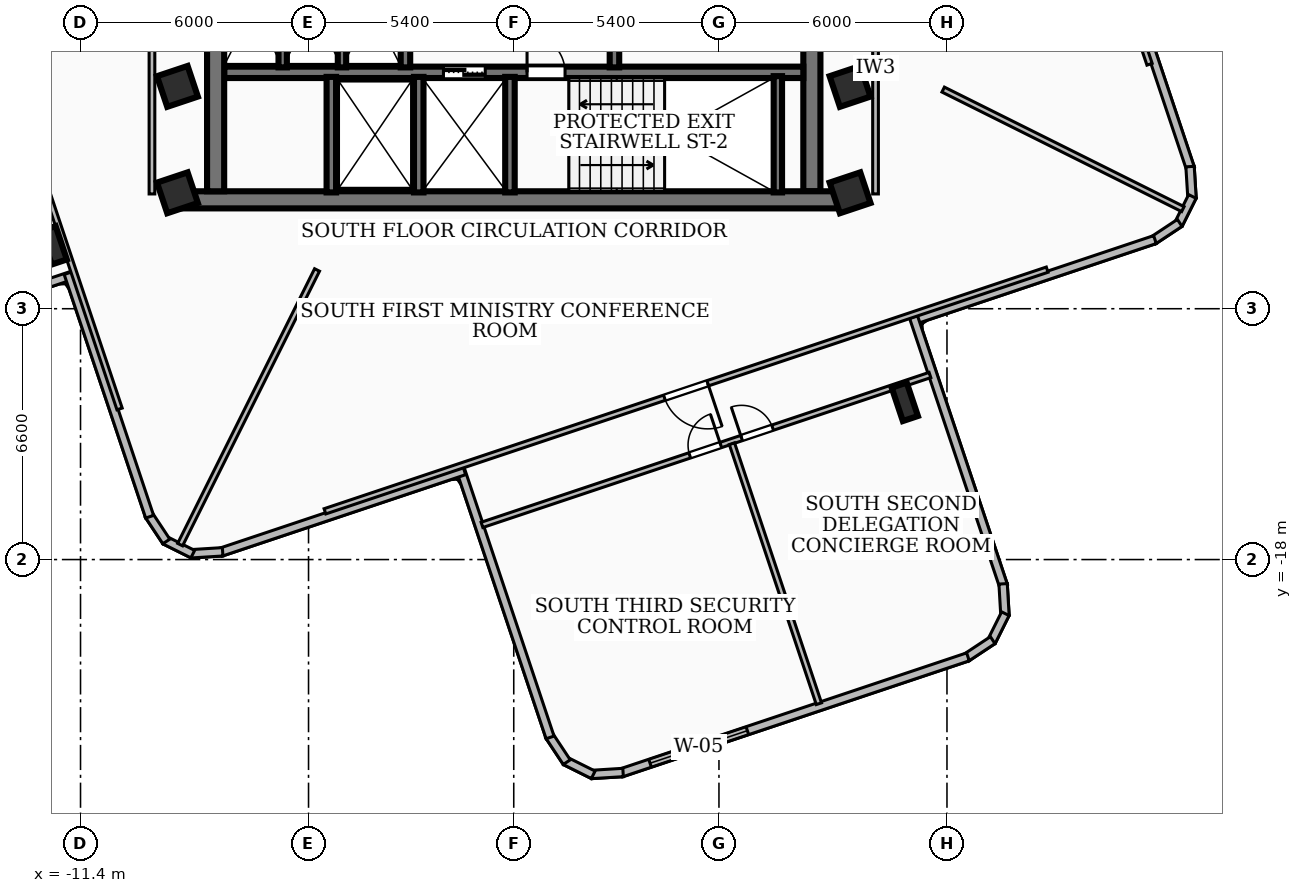
"""IFC4 building model, lengths in metres.
Left out: names, types, materials, properties, quantities, classifications, styles, units other than length and angle.
Written with IfcOpenShell. Run it as: python <this file> out.ifc"""

import sys

from ifc_helpers import new_model, si_unit, direction, frame, frame_2d, origin, origin_2d, place, context, subcontext, project, spatial, rectangle, i_section, extrude, element, fill, save


model = new_model("IFC4")
c1 = context("Model", 3, precision=1e-05, world=origin(), true_north=direction((0.0, 1.0)))
c2 = subcontext(c1, "Body", "Model", "MODEL_VIEW")
j1 = project(units=[si_unit("LENGTHUNIT", "METRE"), si_unit("PLANEANGLEUNIT", "RADIAN")], contexts=[c1])
p1 = place(None, origin())
s1 = spatial("IfcSite", under=j1, at=p1, CompositionType="ELEMENT")
p2 = place(p1, origin())
s2 = spatial("IfcBuilding", under=s1, at=p2, CompositionType="ELEMENT")
p3 = place(p2, frame((0.0, 0.0, 163.08)))
s3 = spatial("IfcBuildingStorey", under=s2, at=p3, CompositionType="ELEMENT", Elevation=163.08)
p4 = place(p3, frame((8.78, -8.535, 0.0), z_axis=(0.0, 0.0, 1.0), x_axis=(-1.0, 0.0, 0.0)))
e1 = element("IfcWall", 1, at=p4, inside=s3, PredefinedType="SHEAR", context=c2, shape_type="SweptSolid", body=[
    extrude(rectangle(XDim=17.56, YDim=0.45, at=frame_2d((8.78, 0.0))), origin(), (0.0, 0.0, 1.0), 3.34),
])
for number, where, z_axis, x_axis in (
    (2, (-7.845, -8.31, 0.0), (0.0, 0.0, 1.0), (0.0, 1.0, 0.0)),
    (3, (7.845, -1.975, 0.0), (0.0, 0.0, 1.0), (0.0, -1.0, 0.0)),
):
    element("IfcWall", number, at=place(p3, frame(where, z_axis=z_axis, x_axis=x_axis)), inside=s3, PredefinedType="SHEAR", context=c2, shape_type="SweptSolid", body=[
        extrude(rectangle(XDim=6.335, YDim=0.45, at=frame_2d((3.167, 0.0))), origin(), (0.0, 0.0, 1.0), 3.34),
    ])
p5 = place(p3, frame((-7.62, -5.18, 0.0), z_axis=(0.0, 0.0, 1.0), x_axis=(1.0, 0.0, 0.0)))
e4 = element("IfcWall", 4, at=p5, inside=s3, PredefinedType="SOLIDWALL", context=c2, shape_type="SweptSolid", body=[
    extrude(rectangle(XDim=15.24, YDim=0.3, at=frame_2d((7.62, 0.0))), origin(), (0.0, 0.0, 1.0), 3.34),
])
p6 = place(p5, frame((5.77, 0.0, 0.0)))
e5 = element("IfcOpeningElement", 5, at=p6, cuts=e4, PredefinedType="OPENING", context=c2, shape_type="SweptSolid", body=[
    extrude(rectangle(XDim=1.1, YDim=2.15, at=frame_2d((0.55, 1.075))), frame((0.0, 0.16, 0.0), z_axis=(0.0, -1.0, 0.0), x_axis=(1.0, 0.0, 0.0)), (0.0, 0.0, 1.0), 0.32),
])
p7 = place(p5, frame((7.97, 0.0, 0.0)))
e6 = element("IfcOpeningElement", 6, at=p7, cuts=e4, PredefinedType="OPENING", context=c2, shape_type="SweptSolid", body=[
    extrude(rectangle(XDim=1.0, YDim=2.1, at=frame_2d((0.5, 1.05))), frame((0.0, 0.16, 0.0), z_axis=(0.0, -1.0, 0.0), x_axis=(1.0, 0.0, 0.0)), (0.0, 0.0, 1.0), 0.32),
])
p8 = place(p3, frame((6.95, -8.34, 0.0), z_axis=(0.0, 0.0, 1.0), x_axis=(0.0, 1.0, 0.0)))
e7 = element("IfcWall", 7, at=p8, inside=s3, PredefinedType="SOLIDWALL", context=c2, shape_type="SweptSolid", body=[
    extrude(rectangle(XDim=3.06, YDim=0.22, at=frame_2d((1.53, 0.0))), origin(), (0.0, 0.0, 1.0), 3.34),
])
for number, where, z_axis, x_axis in (
    (8, (-0.1, -8.34, 0.0), (0.0, 0.0, 1.0), (0.0, 1.0, 0.0)),
    (9, (-2.5, -8.34, 0.0), (0.0, 0.0, 1.0), (0.0, 1.0, 0.0)),
    (10, (-4.8, -8.34, 0.0), (0.0, 0.0, 1.0), (0.0, 1.0, 0.0)),
):
    element("IfcWall", number, at=place(p3, frame(where, z_axis=z_axis, x_axis=x_axis)), inside=s3, PredefinedType="SOLIDWALL", context=c2, shape_type="SweptSolid", body=[
        extrude(rectangle(XDim=3.04, YDim=0.25, at=frame_2d((1.52, 0.0))), origin(), (0.0, 0.0, 1.0), 3.34),
    ])
for number, where, z_axis, x_axis in (
    (11, (-2.85, -5.05, 0.0), (0.0, 0.0, 1.0), (0.0, 1.0, 0.0)),
    (12, (2.65, -5.05, 0.0), (0.0, 0.0, 1.0), (0.0, 1.0, 0.0)),
):
    element("IfcWall", number, at=place(p3, frame(where, z_axis=z_axis, x_axis=x_axis)), inside=s3, PredefinedType="SOLIDWALL", context=c2, shape_type="SweptSolid", body=[
        extrude(rectangle(XDim=3.07, YDim=0.25, at=frame_2d((1.535, 0.0))), origin(), (0.0, 0.0, 1.0), 3.34),
    ])
for number, where, z_axis, x_axis in (
    (13, (-6.08, -5.05, 0.0), (0.0, 0.0, 1.0), (0.0, 1.0, 0.0)),
    (14, (-4.52, -5.05, 0.0), (0.0, 0.0, 1.0), (0.0, 1.0, 0.0)),
):
    element("IfcWall", number, at=place(p3, frame(where, z_axis=z_axis, x_axis=x_axis)), inside=s3, PredefinedType="SOLIDWALL", context=c2, shape_type="SweptSolid", body=[
        extrude(rectangle(XDim=3.07, YDim=0.22, at=frame_2d((1.535, 0.0))), origin(), (0.0, 0.0, 1.0), 3.34),
    ])
for number, where, z_axis, x_axis in (
    (15, (-8.85, -5.55, 0.0), (0.0, 0.0, 1.0), (0.948, 0.317, 0.0)),
    (16, (8.85, -5.55, 0.0), (0.0, 0.0, 1.0), (0.948, 0.317, 0.0)),
    (17, (8.85, -8.35, 0.0), (0.0, 0.0, 1.0), (0.948, 0.317, 0.0)),
    (18, (-8.85, -8.35, 0.0), (0.0, 0.0, 1.0), (0.948, 0.317, 0.0)),
):
    element("IfcColumn", number, at=place(p3, frame(where, z_axis=z_axis, x_axis=x_axis)), inside=s3, PredefinedType="COLUMN", context=c2, shape_type="SweptSolid", body=[
        extrude(rectangle(XDim=0.85, YDim=0.85, at=origin_2d()), origin(), (0.0, 0.0, 1.0), 3.6),
    ])
for number, where, z_axis, x_axis in (
    (19, (-12.106, -9.731, 0.0), (0.0, 0.0, 1.0), (0.948, 0.317, 0.0)),
    (20, (3.29, -19.536, 0.0), (0.0, 0.0, 1.0), (0.948, 0.317, 0.0)),
    (21, (10.29, -13.85, 0.0), (0.0, 0.0, 1.0), (0.948, 0.317, 0.0)),
):
    element("IfcColumn", number, at=place(p3, frame(where, z_axis=z_axis, x_axis=x_axis)), inside=s3, PredefinedType="COLUMN", context=c2, shape_type="SweptSolid", body=[
        extrude(i_section(OverallWidth=0.418, OverallDepth=0.927, WebThickness=0.019, FlangeThickness=0.032, at=origin_2d()), origin(), (0.0, 0.0, 1.0), 3.6),
    ])
p9 = place(p3, frame((-11.615, -10.519, 0.0), z_axis=(0.0, 0.0, 1.0), x_axis=(-0.948329626758, -0.317286808759, 0.0)))
e22 = element("IfcWall", 22, at=p9, inside=s3, PredefinedType="SOLIDWALL", context=c2, shape_type="SweptSolid", body=[
    extrude(rectangle(XDim=9.058, YDim=0.22, at=frame_2d((4.529, 0.0))), origin(), (0.0, 0.0, 1.0), 2.72),
])
p10 = place(p3, frame((15.662, -1.3, 0.0), z_axis=(0.0, 0.0, 1.0), x_axis=(0.317224676093, -0.948350412494, 0.0)))
e23 = element("IfcWall", 23, at=p10, inside=s3, PredefinedType="SOLIDWALL", context=c2, shape_type="SweptSolid", body=[
    extrude(rectangle(XDim=6.758, YDim=0.22, at=frame_2d((3.379, 0.0))), origin(), (0.0, 0.0, 1.0), 3.34),
])
p11 = place(p3, frame((17.796, -7.66, 0.0), z_axis=(0.0, 0.0, 1.0), x_axis=(0.062305442082, -0.998057128569, 0.0)))
e24 = element("IfcWall", 24, at=p11, inside=s3, PredefinedType="SOLIDWALL", context=c2, shape_type="SweptSolid", body=[
    extrude(rectangle(XDim=0.835, YDim=0.22, at=frame_2d((0.417, 0.0))), origin(), (0.0, 0.0, 1.0), 3.34),
])
p12 = place(p3, frame((17.857, -8.446, 0.0), z_axis=(0.0, 0.0, 1.0), x_axis=(-0.446258139106, -0.894904281631, 0.0)))
e25 = element("IfcWall", 25, at=p12, inside=s3, PredefinedType="SOLIDWALL", context=c2, shape_type="SweptSolid", body=[
    extrude(rectangle(XDim=0.818, YDim=0.22, at=frame_2d((0.409, 0.0))), origin(), (0.0, 0.0, 1.0), 3.34),
])
p13 = place(p3, frame((17.524, -9.142, 0.0), z_axis=(0.0, 0.0, 1.0), x_axis=(-0.833756011094, -0.552133058206, 0.0)))
e26 = element("IfcWall", 26, at=p13, inside=s3, PredefinedType="SOLIDWALL", context=c2, shape_type="SweptSolid", body=[
    extrude(rectangle(XDim=0.835, YDim=0.22, at=frame_2d((0.417, 0.0))), origin(), (0.0, 0.0, 1.0), 3.34),
])
p14 = place(p3, frame((16.873, -9.581, 0.0), z_axis=(0.0, 0.0, 1.0), x_axis=(-0.94829606055, -0.317387116224, 0.0)))
e27 = element("IfcWall", 27, at=p14, inside=s3, PredefinedType="SOLIDWALL", context=c2, shape_type="SweptSolid", body=[
    extrude(rectangle(XDim=6.758, YDim=0.22, at=frame_2d((3.379, 0.0))), origin(), (0.0, 0.0, 1.0), 3.34),
])
p15 = place(p3, frame((10.519, -11.615, 0.0), z_axis=(0.0, 0.0, 1.0), x_axis=(0.317347016501, -0.948309480664, 0.0)))
e28 = element("IfcWall", 28, at=p15, inside=s3, PredefinedType="SOLIDWALL", context=c2, shape_type="SweptSolid", body=[
    extrude(rectangle(XDim=7.458, YDim=0.22, at=frame_2d((3.729, 0.0))), origin(), (0.0, 0.0, 1.0), 3.34),
])
p16 = place(p3, frame((12.877, -18.639, 0.0), z_axis=(0.0, 0.0, 1.0), x_axis=(0.05880777677, -0.998269325078, 0.0)))
e29 = element("IfcWall", 29, at=p16, inside=s3, PredefinedType="SOLIDWALL", context=c2, shape_type="SweptSolid", body=[
    extrude(rectangle(XDim=0.834, YDim=0.22, at=frame_2d((0.417, 0.0))), origin(), (0.0, 0.0, 1.0), 3.34),
])
p17 = place(p3, frame((12.936, -19.425, 0.0), z_axis=(0.0, 0.0, 1.0), x_axis=(-0.446258139106, -0.894904281631, 0.0)))
e30 = element("IfcWall", 30, at=p17, inside=s3, PredefinedType="SOLIDWALL", context=c2, shape_type="SweptSolid", body=[
    extrude(rectangle(XDim=0.818, YDim=0.22, at=frame_2d((0.409, 0.0))), origin(), (0.0, 0.0, 1.0), 3.34),
])
p18 = place(p3, frame((12.603, -20.121, 0.0), z_axis=(0.0, 0.0, 1.0), x_axis=(-0.833756011094, -0.552133058206, 0.0)))
e31 = element("IfcWall", 31, at=p18, inside=s3, PredefinedType="SOLIDWALL", context=c2, shape_type="SweptSolid", body=[
    extrude(rectangle(XDim=0.835, YDim=0.22, at=frame_2d((0.417, 0.0))), origin(), (0.0, 0.0, 1.0), 3.34),
])
p19 = place(p3, frame((11.952, -20.56, 0.0), z_axis=(0.0, 0.0, 1.0), x_axis=(-0.94831980895, -0.317316151421, 0.0)))
e32 = element("IfcWall", 32, at=p19, inside=s3, PredefinedType="SOLIDWALL", context=c2, shape_type="SweptSolid", body=[
    extrude(rectangle(XDim=9.621, YDim=0.22, at=frame_2d((4.811, 0.0))), origin(), (0.0, 0.0, 1.0), 3.34),
])
p20 = place(p19, frame((6.121, 0.0, 0.85)))
e33 = element("IfcOpeningElement", 33, at=p20, cuts=e32, PredefinedType="OPENING", context=c2, shape_type="SweptSolid", body=[
    extrude(rectangle(XDim=2.7, YDim=1.85, at=frame_2d((1.35, 0.925))), frame((0.0, 0.12, 0.0), z_axis=(0.0, -1.0, 0.0), x_axis=(1.0, 0.0, 0.0)), (0.0, 0.0, 1.0), 0.24),
])
p21 = place(p3, frame((2.877, -23.603, 0.0), z_axis=(0.0, 0.0, 1.0), x_axis=(-0.998057128569, -0.062305442082, 0.0)))
e34 = element("IfcWall", 34, at=p21, inside=s3, PredefinedType="SOLIDWALL", context=c2, shape_type="SweptSolid", body=[
    extrude(rectangle(XDim=0.835, YDim=0.22, at=frame_2d((0.417, 0.0))), origin(), (0.0, 0.0, 1.0), 3.34),
])
p22 = place(p3, frame((2.091, -23.664, 0.0), z_axis=(0.0, 0.0, 1.0), x_axis=(-0.894963703084, 0.446138958356, 0.0)))
e35 = element("IfcWall", 35, at=p22, inside=s3, PredefinedType="SOLIDWALL", context=c2, shape_type="SweptSolid", body=[
    extrude(rectangle(XDim=0.818, YDim=0.22, at=frame_2d((0.409, 0.0))), origin(), (0.0, 0.0, 1.0), 3.34),
])
p23 = place(p3, frame((1.395, -23.331, 0.0), z_axis=(0.0, 0.0, 1.0), x_axis=(-0.552133058206, 0.833756011094, 0.0)))
e36 = element("IfcWall", 36, at=p23, inside=s3, PredefinedType="SOLIDWALL", context=c2, shape_type="SweptSolid", body=[
    extrude(rectangle(XDim=0.835, YDim=0.22, at=frame_2d((0.417, 0.0))), origin(), (0.0, 0.0, 1.0), 3.34),
])
p24 = place(p3, frame((0.956, -22.68, 0.0), z_axis=(0.0, 0.0, 1.0), x_axis=(-0.317347016501, 0.948309480664, 0.0)))
e37 = element("IfcWall", 37, at=p24, inside=s3, PredefinedType="SOLIDWALL", context=c2, shape_type="SweptSolid", body=[
    extrude(rectangle(XDim=7.458, YDim=0.22, at=frame_2d((3.729, 0.0))), origin(), (0.0, 0.0, 1.0), 2.644),
])
p25 = place(p3, frame((-1.3, -15.662, 0.0), z_axis=(0.0, 0.0, 1.0), x_axis=(-0.948350412494, -0.317224676093, 0.0)))
e38 = element("IfcWall", 38, at=p25, inside=s3, PredefinedType="SOLIDWALL", context=c2, shape_type="SweptSolid", body=[
    extrude(rectangle(XDim=6.758, YDim=0.22, at=frame_2d((3.379, 0.0))), origin(), (0.0, 0.0, 1.0), 2.644),
])
p26 = place(p3, frame((-7.66, -17.796, 0.0), z_axis=(0.0, 0.0, 1.0), x_axis=(-0.998057128569, -0.062305442082, 0.0)))
e39 = element("IfcWall", 39, at=p26, inside=s3, PredefinedType="SOLIDWALL", context=c2, shape_type="SweptSolid", body=[
    extrude(rectangle(XDim=0.835, YDim=0.22, at=frame_2d((0.417, 0.0))), origin(), (0.0, 0.0, 1.0), 3.34),
])
p27 = place(p3, frame((-8.446, -17.857, 0.0), z_axis=(0.0, 0.0, 1.0), x_axis=(-0.894904281631, 0.446258139106, 0.0)))
e40 = element("IfcWall", 40, at=p27, inside=s3, PredefinedType="SOLIDWALL", context=c2, shape_type="SweptSolid", body=[
    extrude(rectangle(XDim=0.818, YDim=0.22, at=frame_2d((0.409, 0.0))), origin(), (0.0, 0.0, 1.0), 3.34),
])
p28 = place(p3, frame((-9.142, -17.524, 0.0), z_axis=(0.0, 0.0, 1.0), x_axis=(-0.552133058206, 0.833756011094, 0.0)))
e41 = element("IfcWall", 41, at=p28, inside=s3, PredefinedType="SOLIDWALL", context=c2, shape_type="SweptSolid", body=[
    extrude(rectangle(XDim=0.835, YDim=0.22, at=frame_2d((0.417, 0.0))), origin(), (0.0, 0.0, 1.0), 3.34),
])
p29 = place(p3, frame((-9.581, -16.873, 0.0), z_axis=(0.0, 0.0, 1.0), x_axis=(-0.317387116224, 0.94829606055, 0.0)))
e42 = element("IfcWall", 42, at=p29, inside=s3, PredefinedType="SOLIDWALL", context=c2, shape_type="SweptSolid", body=[
    extrude(rectangle(XDim=6.758, YDim=0.22, at=frame_2d((3.379, 0.0))), origin(), (0.0, 0.0, 1.0), 2.72),
])
p30 = place(p3, frame((-9.52, -8.38, 0.0), z_axis=(0.0, 0.0, 1.0), x_axis=(0.0, 1.0, 0.0)))
e43 = element("IfcWall", 43, at=p30, inside=s3, PredefinedType="PARTITIONING", context=c2, shape_type="SweptSolid", body=[
    extrude(rectangle(XDim=6.63, YDim=0.15, at=frame_2d((3.315, 0.0))), origin(), (0.0, 0.0, 1.0), 2.644),
])
p31 = place(p3, frame((9.52, -8.38, 0.0), z_axis=(0.0, 0.0, 1.0), x_axis=(0.0, 1.0, 0.0)))
e44 = element("IfcWall", 44, at=p31, inside=s3, PredefinedType="PARTITIONING", context=c2, shape_type="SweptSolid", body=[
    extrude(rectangle(XDim=6.63, YDim=0.15, at=frame_2d((3.315, 0.0))), origin(), (0.0, 0.0, 1.0), 3.34),
])
p32 = place(p3, frame((-5.176, -10.38, 0.0), z_axis=(0.0, 0.0, 1.0), x_axis=(-0.446173290391, -0.894946587759, 0.0)))
e45 = element("IfcWall", 45, at=p32, inside=s3, PredefinedType="PARTITIONING", context=c2, shape_type="SweptSolid", body=[
    extrude(rectangle(XDim=8.075, YDim=0.145, at=frame_2d((4.038, 0.0))), origin(), (0.0, 0.0, 1.0), 2.644),
])
p33 = place(p3, frame((11.3, -5.634, 0.0), z_axis=(0.0, 0.0, 1.0), x_axis=(0.894904738475, -0.446257222972, 0.0)))
e46 = element("IfcWall", 46, at=p33, inside=s3, PredefinedType="PARTITIONING", context=c2, shape_type="SweptSolid", body=[
    extrude(rectangle(XDim=7.048, YDim=0.145, at=frame_2d((3.524, 0.0))), origin(), (0.0, 0.0, 1.0), 3.34),
])
p34 = place(p3, frame((10.372, 14.037, 0.0), z_axis=(0.0, 0.0, 1.0), x_axis=(0.317298382655, -0.94832575435, 0.0)))
e47 = element("IfcWall", 47, at=p34, inside=s3, PredefinedType="PARTITIONING", context=c2, shape_type="SweptSolid", body=[
    extrude(rectangle(XDim=20.041, YDim=0.145, at=frame_2d((10.021, 0.0))), origin(), (0.0, 0.0, 1.0), 2.644),
])
p35 = place(p34, frame((9.42, 0.0, 0.0)))
e48 = element("IfcOpeningElement", 48, at=p35, cuts=e47, PredefinedType="OPENING", context=c2, shape_type="SweptSolid", body=[
    extrude(rectangle(XDim=1.2, YDim=2.1, at=frame_2d((0.6, 1.05))), frame((0.0, 0.083, 0.0), z_axis=(0.0, -1.0, 0.0), x_axis=(1.0, 0.0, 0.0)), (0.0, 0.0, 1.0), 0.165),
])
p36 = place(p3, frame((-10.372, -14.037, 0.0), z_axis=(0.0, 0.0, 1.0), x_axis=(-0.317298382655, 0.94832575435, 0.0)))
e49 = element("IfcWall", 49, at=p36, inside=s3, PredefinedType="PARTITIONING", context=c2, shape_type="SweptSolid", body=[
    extrude(rectangle(XDim=20.041, YDim=0.145, at=frame_2d((10.021, 0.0))), origin(), (0.0, 0.0, 1.0), 2.644),
])
p37 = place(p36, frame((9.42, 0.0, 0.0)))
e50 = element("IfcOpeningElement", 50, at=p37, cuts=e49, PredefinedType="OPENING", context=c2, shape_type="SweptSolid", body=[
    extrude(rectangle(XDim=1.2, YDim=2.1, at=frame_2d((0.6, 1.05))), frame((0.0, 0.083, 0.0), z_axis=(0.0, -1.0, 0.0), x_axis=(1.0, 0.0, 0.0)), (0.0, 0.0, 1.0), 0.165),
])
p38 = place(p3, frame((14.037, -10.372, 0.0), z_axis=(0.0, 0.0, 1.0), x_axis=(-0.94832575435, -0.317298382655, 0.0)))
e51 = element("IfcWall", 51, at=p38, inside=s3, PredefinedType="PARTITIONING", context=c2, shape_type="SweptSolid", body=[
    extrude(rectangle(XDim=20.041, YDim=0.145, at=frame_2d((10.021, 0.0))), origin(), (0.0, 0.0, 1.0), 2.644),
])
p39 = place(p38, frame((9.42, 0.0, 0.0)))
e52 = element("IfcOpeningElement", 52, at=p39, cuts=e51, PredefinedType="OPENING", context=c2, shape_type="SweptSolid", body=[
    extrude(rectangle(XDim=1.2, YDim=2.1, at=frame_2d((0.6, 1.05))), frame((0.0, 0.083, 0.0), z_axis=(0.0, -1.0, 0.0), x_axis=(1.0, 0.0, 0.0)), (0.0, 0.0, 1.0), 0.165),
])
p40 = place(p3, frame((5.741, -14.951, 0.0), z_axis=(0.0, 0.0, 1.0), x_axis=(0.317273194857, -0.948334181513, 0.0)))
e53 = element("IfcWall", 53, at=p40, inside=s3, PredefinedType="PARTITIONING", context=c2, shape_type="SweptSolid", body=[
    extrude(rectangle(XDim=7.215, YDim=0.145, at=frame_2d((3.607, 0.0))), origin(), (0.0, 0.0, 1.0), 3.34),
])
p41 = place(p3, frame((-0.836, -17.088, 0.0), z_axis=(0.0, 0.0, 1.0), x_axis=(0.948331136084, 0.317282297544, 0.0)))
e54 = element("IfcWall", 54, at=p41, inside=s3, PredefinedType="PARTITIONING", context=c2, shape_type="SweptSolid", body=[
    extrude(rectangle(XDim=12.43, YDim=0.145, at=frame_2d((6.215, 0.0))), origin(), (0.0, 0.0, 1.0), 2.644),
])
p42 = place(p41, frame((5.765, 0.0, 0.0)))
e55 = element("IfcOpeningElement", 55, at=p42, cuts=e54, PredefinedType="OPENING", context=c2, shape_type="SweptSolid", body=[
    extrude(rectangle(XDim=0.86, YDim=2.04, at=frame_2d((0.43, 1.02))), frame((0.0, 0.083, 0.0), z_axis=(0.0, -1.0, 0.0), x_axis=(1.0, 0.0, 0.0)), (0.0, 0.0, 1.0), 0.165),
])
p43 = place(p41, frame((7.204, 0.0, 0.0)))
e56 = element("IfcOpeningElement", 56, at=p43, cuts=e54, PredefinedType="OPENING", context=c2, shape_type="SweptSolid", body=[
    extrude(rectangle(XDim=0.86, YDim=2.04, at=frame_2d((0.43, 1.02))), frame((0.0, 0.083, 0.0), z_axis=(0.0, -1.0, 0.0), x_axis=(1.0, 0.0, 0.0)), (0.0, 0.0, 1.0), 0.165),
])
p44 = place(p20, origin())
e57 = element("IfcWindow", 57, at=p44, inside=s3, PartitioningType="SINGLE_PANEL", PredefinedType="WINDOW", context=c2, shape_type="SweptSolid", body=[
    extrude(rectangle(XDim=2.7, YDim=1.85, at=frame_2d((1.35, 0.925))), frame((0.0, 0.03, 0.0), z_axis=(0.0, -1.0, 0.0), x_axis=(1.0, 0.0, 0.0)), (0.0, 0.0, 1.0), 0.06),
])
fill(e33, e57)
p45 = place(p6, origin())
e58 = element("IfcDoor", 58, at=p45, inside=s3, OperationType="DOUBLE_DOOR_SLIDING", PredefinedType="DOOR", context=c2, shape_type="SweptSolid", body=[
    extrude(rectangle(XDim=1.1, YDim=2.15, at=frame_2d((0.55, 1.075))), frame((0.0, 0.025, 0.0), z_axis=(0.0, -1.0, 0.0), x_axis=(1.0, 0.0, 0.0)), (0.0, 0.0, 1.0), 0.05),
])
fill(e5, e58)
p46 = place(p7, origin())
e59 = element("IfcDoor", 59, at=p46, inside=s3, OperationType="SINGLE_SWING_LEFT", PredefinedType="DOOR", context=c2, shape_type="SweptSolid", body=[
    extrude(rectangle(XDim=1.0, YDim=2.1, at=frame_2d((0.5, 1.05))), frame((0.0, 0.025, 0.0), z_axis=(0.0, -1.0, 0.0), x_axis=(1.0, 0.0, 0.0)), (0.0, 0.0, 1.0), 0.05),
])
fill(e6, e59)
p47 = place(p39, origin())
e60 = element("IfcDoor", 60, at=p47, inside=s3, OperationType="SINGLE_SWING_LEFT", PredefinedType="DOOR", context=c2, shape_type="SweptSolid", body=[
    extrude(rectangle(XDim=1.2, YDim=2.1, at=frame_2d((0.6, 1.05))), frame((0.0, 0.025, 0.0), z_axis=(0.0, -1.0, 0.0), x_axis=(1.0, 0.0, 0.0)), (0.0, 0.0, 1.0), 0.05),
])
fill(e52, e60)
p48 = place(p42, origin())
e61 = element("IfcDoor", 61, at=p48, inside=s3, OperationType="SINGLE_SWING_RIGHT", PredefinedType="DOOR", context=c2, shape_type="SweptSolid", body=[
    extrude(rectangle(XDim=0.86, YDim=2.04, at=frame_2d((0.43, 1.02))), frame((0.0, 0.025, 0.0), z_axis=(0.0, -1.0, 0.0), x_axis=(1.0, 0.0, 0.0)), (0.0, 0.0, 1.0), 0.05),
])
fill(e55, e61)
p49 = place(p43, origin())
e62 = element("IfcDoor", 62, at=p49, inside=s3, OperationType="SINGLE_SWING_LEFT", PredefinedType="DOOR", context=c2, shape_type="SweptSolid", body=[
    extrude(rectangle(XDim=0.86, YDim=2.04, at=frame_2d((0.43, 1.02))), frame((0.0, 0.025, 0.0), z_axis=(0.0, -1.0, 0.0), x_axis=(1.0, 0.0, 0.0)), (0.0, 0.0, 1.0), 0.05),
])
fill(e56, e62)
save(model, sys.argv[1])
